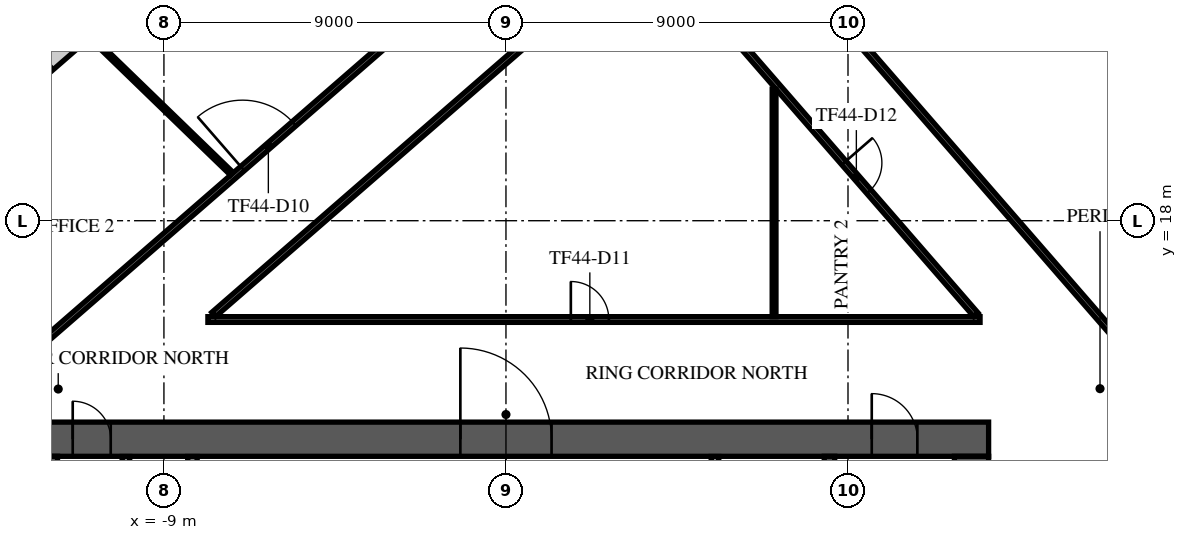
"""IFC4 building model, lengths in metres.
Left out: names, types, materials, properties, quantities, classifications, styles, units other than length and angle.
Written with IfcOpenShell. Run it as: python <this file> out.ifc"""

import sys

from ifc_helpers import new_model, si_unit, direction, frame, frame_2d, origin, place, context, subcontext, project, spatial, rectangle, extrude, element, fill, save


model = new_model("IFC4")
c1 = context("Model", 3, precision=1e-05, world=origin(), true_north=direction((0.0, 1.0)))
c2 = subcontext(c1, "Body", "Model", "MODEL_VIEW")
j1 = project(units=[si_unit("LENGTHUNIT", "METRE"), si_unit("PLANEANGLEUNIT", "RADIAN")], contexts=[c1])
p1 = place(None, origin())
s1 = spatial("IfcSite", under=j1, at=p1, CompositionType="ELEMENT")
p2 = place(p1, origin())
s2 = spatial("IfcBuilding", under=s1, at=p2, CompositionType="ELEMENT")
p3 = place(p2, frame((0.0, 0.0, 193.3)))
s3 = spatial("IfcBuildingStorey", under=s2, at=p3, CompositionType="ELEMENT", Elevation=193.3)
p4 = place(p3, frame((-12.7, 12.25, 0.0), z_axis=(0.0, 0.0, 1.0), x_axis=(1.0, 0.0, 0.0)))
e1 = element("IfcWall", 1, at=p4, inside=s3, PredefinedType="SHEAR", context=c2, shape_type="SweptSolid", body=[
    extrude(rectangle(XDim=25.4, YDim=0.9, at=frame_2d((12.7, 0.0))), origin(), (0.0, 0.0, 1.0), 3.62),
])
p5 = place(p4, frame((11.5, 0.0, 0.0)))
e2 = element("IfcOpeningElement", 2, at=p5, cuts=e1, PredefinedType="OPENING", context=c2, shape_type="SweptSolid", body=[
    extrude(rectangle(XDim=2.4, YDim=2.4, at=frame_2d((1.2, 1.2))), frame((0.0, 0.46, 0.0), z_axis=(0.0, -1.0, 0.0), x_axis=(1.0, 0.0, 0.0)), (0.0, 0.0, 1.0), 0.92),
])
p6 = place(p4, frame((22.325, 0.0, 0.0)))
e3 = element("IfcOpeningElement", 3, at=p6, cuts=e1, PredefinedType="OPENING", context=c2, shape_type="SweptSolid", body=[
    extrude(rectangle(XDim=1.2, YDim=2.1, at=frame_2d((0.6, 1.05))), frame((0.0, 0.46, 0.0), z_axis=(0.0, -1.0, 0.0), x_axis=(1.0, 0.0, 0.0)), (0.0, 0.0, 1.0), 0.92),
])
p7 = place(p4, frame((1.3, 0.0, 0.0)))
e4 = element("IfcOpeningElement", 4, at=p7, cuts=e1, PredefinedType="OPENING", context=c2, shape_type="SweptSolid", body=[
    extrude(rectangle(XDim=1.0, YDim=2.1, at=frame_2d((0.5, 1.05))), frame((0.0, 0.46, 0.0), z_axis=(0.0, -1.0, 0.0), x_axis=(1.0, 0.0, 0.0)), (0.0, 0.0, 1.0), 0.92),
])
p8 = place(p3, frame((12.25, -11.8, 0.0), z_axis=(0.0, 0.0, 1.0), x_axis=(0.0, 1.0, 0.0)))
e5 = element("IfcWall", 5, at=p8, inside=s3, PredefinedType="SHEAR", context=c2, shape_type="SweptSolid", body=[
    extrude(rectangle(XDim=23.6, YDim=0.9, at=frame_2d((11.8, 0.0))), origin(), (0.0, 0.0, 1.0), 3.62),
])
p9 = place(p8, frame((10.6, 0.0, 0.0)))
e6 = element("IfcOpeningElement", 6, at=p9, cuts=e5, PredefinedType="OPENING", context=c2, shape_type="SweptSolid", body=[
    extrude(rectangle(XDim=2.4, YDim=2.4, at=frame_2d((1.2, 1.2))), frame((0.0, 0.46, 0.0), z_axis=(0.0, -1.0, 0.0), x_axis=(1.0, 0.0, 0.0)), (0.0, 0.0, 1.0), 0.92),
])
p10 = place(p3, frame((-12.25, -11.8, 0.0), z_axis=(0.0, 0.0, 1.0), x_axis=(0.0, 1.0, 0.0)))
e7 = element("IfcWall", 7, at=p10, inside=s3, PredefinedType="SHEAR", context=c2, shape_type="SweptSolid", body=[
    extrude(rectangle(XDim=23.6, YDim=0.9, at=frame_2d((11.8, 0.0))), origin(), (0.0, 0.0, 1.0), 3.62),
])
p11 = place(p10, frame((10.6, 0.0, 0.0)))
e8 = element("IfcOpeningElement", 8, at=p11, cuts=e7, PredefinedType="OPENING", context=c2, shape_type="SweptSolid", body=[
    extrude(rectangle(XDim=2.4, YDim=2.4, at=frame_2d((1.2, 1.2))), frame((0.0, 0.46, 0.0), z_axis=(0.0, -1.0, 0.0), x_axis=(1.0, 0.0, 0.0)), (0.0, 0.0, 1.0), 0.92),
])
p12 = place(p3, frame((8.512, 4.55, 0.0), z_axis=(0.0, 0.0, 1.0), x_axis=(0.0, 1.0, 0.0)))
e9 = element("IfcWall", 9, at=p12, inside=s3, PredefinedType="SOLIDWALL", context=c2, shape_type="SweptSolid", body=[
    extrude(rectangle(XDim=7.25, YDim=0.275, at=frame_2d((3.625, 0.0))), origin(), (0.0, 0.0, 1.0), 3.62),
])
p13 = place(p12, frame((6.0, 0.0, 0.0)))
e10 = element("IfcOpeningElement", 10, at=p13, cuts=e9, PredefinedType="OPENING", context=c2, shape_type="SweptSolid", body=[
    extrude(rectangle(XDim=1.0, YDim=2.1, at=frame_2d((0.5, 1.05))), frame((0.0, 0.147, 0.0), z_axis=(0.0, -1.0, 0.0), x_axis=(1.0, 0.0, 0.0)), (0.0, 0.0, 1.0), 0.295),
])
p14 = place(p3, frame((-10.0, 4.78, 0.0), z_axis=(0.0, 0.0, 1.0), x_axis=(0.0, 1.0, 0.0)))
e11 = element("IfcWall", 11, at=p14, inside=s3, PredefinedType="PARTITIONING", context=c2, shape_type="SweptSolid", body=[
    extrude(rectangle(XDim=7.015, YDim=0.2, at=frame_2d((3.507, 0.0))), origin(), (0.0, 0.0, 1.0), 3.62),
])
p15 = place(p14, frame((2.92, 0.0, 0.0)))
e12 = element("IfcOpeningElement", 12, at=p15, cuts=e11, PredefinedType="OPENING", context=c2, shape_type="SweptSolid", body=[
    extrude(rectangle(XDim=1.0, YDim=2.1, at=frame_2d((0.5, 1.05))), frame((0.0, 0.11, 0.0), z_axis=(0.0, -1.0, 0.0), x_axis=(1.0, 0.0, 0.0)), (0.0, 0.0, 1.0), 0.22),
])
p16 = place(p3, frame((-8.25, 8.805, 0.0), z_axis=(0.0, 0.0, 1.0), x_axis=(0.0, 1.0, 0.0)))
e13 = element("IfcWall", 13, at=p16, inside=s3, PredefinedType="PARTITIONING", context=c2, shape_type="SweptSolid", body=[
    extrude(rectangle(XDim=2.99, YDim=0.25, at=frame_2d((1.495, 0.0))), origin(), (0.0, 0.0, 1.0), 3.62),
])
p17 = place(p16, frame((0.895, 0.0, 0.0)))
e14 = element("IfcOpeningElement", 14, at=p17, cuts=e13, PredefinedType="OPENING", context=c2, shape_type="SweptSolid", body=[
    extrude(rectangle(XDim=1.0, YDim=2.1, at=frame_2d((0.5, 1.05))), frame((0.0, 0.135, 0.0), z_axis=(0.0, -1.0, 0.0), x_axis=(1.0, 0.0, 0.0)), (0.0, 0.0, 1.0), 0.27),
])
p18 = place(p3, frame((5.5, 8.805, 0.0), z_axis=(0.0, 0.0, 1.0), x_axis=(0.0, 1.0, 0.0)))
e15 = element("IfcWall", 15, at=p18, inside=s3, PredefinedType="PARTITIONING", context=c2, shape_type="SweptSolid", body=[
    extrude(rectangle(XDim=2.99, YDim=0.2, at=frame_2d((1.495, 0.0))), origin(), (0.0, 0.0, 1.0), 3.62),
])
p19 = place(p18, frame((0.532, 0.0, 0.0)))
e16 = element("IfcOpeningElement", 16, at=p19, cuts=e15, PredefinedType="OPENING", context=c2, shape_type="SweptSolid", body=[
    extrude(rectangle(XDim=1.8, YDim=2.1, at=frame_2d((0.9, 1.05))), frame((0.0, 0.11, 0.0), z_axis=(0.0, -1.0, 0.0), x_axis=(1.0, 0.0, 0.0)), (0.0, 0.0, 1.0), 0.22),
])
p20 = place(p3, frame((2.286, 34.715, 0.0), z_axis=(0.0, 0.0, 1.0), x_axis=(-0.754708272811, -0.656060532993, 0.0)))
e17 = element("IfcWall", 17, at=p20, inside=s3, PredefinedType="STANDARD", context=c2, shape_type="SweptSolid", body=[
    extrude(rectangle(XDim=49.0, YDim=0.6, at=frame_2d((24.5, 0.0))), origin(), (0.0, 0.0, 1.0), 3.62),
])
p21 = place(p20, frame((1.227, 0.0, 0.9)))
e18 = element("IfcOpeningElement", 18, at=p21, cuts=e17, PredefinedType="OPENING", context=c2, shape_type="SweptSolid", body=[
    extrude(rectangle(XDim=2.0, YDim=2.1, at=frame_2d((1.0, 1.05))), frame((0.0, 0.31, 0.0), z_axis=(0.0, -1.0, 0.0), x_axis=(1.0, 0.0, 0.0)), (0.0, 0.0, 1.0), 0.62),
])
p22 = place(p20, frame((5.682, 0.0, 0.9)))
e19 = element("IfcOpeningElement", 19, at=p22, cuts=e17, PredefinedType="OPENING", context=c2, shape_type="SweptSolid", body=[
    extrude(rectangle(XDim=2.0, YDim=2.1, at=frame_2d((1.0, 1.05))), frame((0.0, 0.31, 0.0), z_axis=(0.0, -1.0, 0.0), x_axis=(1.0, 0.0, 0.0)), (0.0, 0.0, 1.0), 0.62),
])
p23 = place(p20, frame((10.136, 0.0, 0.9)))
e20 = element("IfcOpeningElement", 20, at=p23, cuts=e17, PredefinedType="OPENING", context=c2, shape_type="SweptSolid", body=[
    extrude(rectangle(XDim=2.0, YDim=2.1, at=frame_2d((1.0, 1.05))), frame((0.0, 0.31, 0.0), z_axis=(0.0, -1.0, 0.0), x_axis=(1.0, 0.0, 0.0)), (0.0, 0.0, 1.0), 0.62),
])
p24 = place(p20, frame((14.591, 0.0, 0.9)))
e21 = element("IfcOpeningElement", 21, at=p24, cuts=e17, PredefinedType="OPENING", context=c2, shape_type="SweptSolid", body=[
    extrude(rectangle(XDim=2.0, YDim=2.1, at=frame_2d((1.0, 1.05))), frame((0.0, 0.31, 0.0), z_axis=(0.0, -1.0, 0.0), x_axis=(1.0, 0.0, 0.0)), (0.0, 0.0, 1.0), 0.62),
])
p25 = place(p20, frame((19.045, 0.0, 0.9)))
e22 = element("IfcOpeningElement", 22, at=p25, cuts=e17, PredefinedType="OPENING", context=c2, shape_type="SweptSolid", body=[
    extrude(rectangle(XDim=2.0, YDim=2.1, at=frame_2d((1.0, 1.05))), frame((0.0, 0.31, 0.0), z_axis=(0.0, -1.0, 0.0), x_axis=(1.0, 0.0, 0.0)), (0.0, 0.0, 1.0), 0.62),
])
p26 = place(p20, frame((23.5, 0.0, 0.9)))
e23 = element("IfcOpeningElement", 23, at=p26, cuts=e17, PredefinedType="OPENING", context=c2, shape_type="SweptSolid", body=[
    extrude(rectangle(XDim=2.0, YDim=2.1, at=frame_2d((1.0, 1.05))), frame((0.0, 0.31, 0.0), z_axis=(0.0, -1.0, 0.0), x_axis=(1.0, 0.0, 0.0)), (0.0, 0.0, 1.0), 0.62),
])
p27 = place(p20, frame((27.955, 0.0, 0.9)))
e24 = element("IfcOpeningElement", 24, at=p27, cuts=e17, PredefinedType="OPENING", context=c2, shape_type="SweptSolid", body=[
    extrude(rectangle(XDim=2.0, YDim=2.1, at=frame_2d((1.0, 1.05))), frame((0.0, 0.31, 0.0), z_axis=(0.0, -1.0, 0.0), x_axis=(1.0, 0.0, 0.0)), (0.0, 0.0, 1.0), 0.62),
])
p28 = place(p20, frame((32.409, 0.0, 0.9)))
e25 = element("IfcOpeningElement", 25, at=p28, cuts=e17, PredefinedType="OPENING", context=c2, shape_type="SweptSolid", body=[
    extrude(rectangle(XDim=2.0, YDim=2.1, at=frame_2d((1.0, 1.05))), frame((0.0, 0.31, 0.0), z_axis=(0.0, -1.0, 0.0), x_axis=(1.0, 0.0, 0.0)), (0.0, 0.0, 1.0), 0.62),
])
p29 = place(p20, frame((36.864, 0.0, 0.9)))
e26 = element("IfcOpeningElement", 26, at=p29, cuts=e17, PredefinedType="OPENING", context=c2, shape_type="SweptSolid", body=[
    extrude(rectangle(XDim=2.0, YDim=2.1, at=frame_2d((1.0, 1.05))), frame((0.0, 0.31, 0.0), z_axis=(0.0, -1.0, 0.0), x_axis=(1.0, 0.0, 0.0)), (0.0, 0.0, 1.0), 0.62),
])
p30 = place(p20, frame((41.318, 0.0, 0.9)))
e27 = element("IfcOpeningElement", 27, at=p30, cuts=e17, PredefinedType="OPENING", context=c2, shape_type="SweptSolid", body=[
    extrude(rectangle(XDim=2.0, YDim=2.1, at=frame_2d((1.0, 1.05))), frame((0.0, 0.31, 0.0), z_axis=(0.0, -1.0, 0.0), x_axis=(1.0, 0.0, 0.0)), (0.0, 0.0, 1.0), 0.62),
])
p31 = place(p20, frame((45.773, 0.0, 0.9)))
e28 = element("IfcOpeningElement", 28, at=p31, cuts=e17, PredefinedType="OPENING", context=c2, shape_type="SweptSolid", body=[
    extrude(rectangle(XDim=2.0, YDim=2.1, at=frame_2d((1.0, 1.05))), frame((0.0, 0.31, 0.0), z_axis=(0.0, -1.0, 0.0), x_axis=(1.0, 0.0, 0.0)), (0.0, 0.0, 1.0), 0.62),
])
p32 = place(p3, frame((35.208, 4.768, 0.0), z_axis=(0.0, 0.0, 1.0), x_axis=(-0.656058749455, 0.754709823219, 0.0)))
e29 = element("IfcWall", 29, at=p32, inside=s3, PredefinedType="STANDARD", context=c2, shape_type="SweptSolid", body=[
    extrude(rectangle(XDim=39.0, YDim=0.6, at=frame_2d((19.5, 0.0))), origin(), (0.0, 0.0, 1.0), 3.62),
])
p33 = place(p32, frame((1.217, 0.0, 0.9)))
e30 = element("IfcOpeningElement", 30, at=p33, cuts=e29, PredefinedType="OPENING", context=c2, shape_type="SweptSolid", body=[
    extrude(rectangle(XDim=1.9, YDim=2.1, at=frame_2d((0.95, 1.05))), frame((0.0, 0.31, 0.0), z_axis=(0.0, -1.0, 0.0), x_axis=(1.0, 0.0, 0.0)), (0.0, 0.0, 1.0), 0.62),
])
p34 = place(p32, frame((5.55, 0.0, 0.9)))
e31 = element("IfcOpeningElement", 31, at=p34, cuts=e29, PredefinedType="OPENING", context=c2, shape_type="SweptSolid", body=[
    extrude(rectangle(XDim=1.9, YDim=2.1, at=frame_2d((0.95, 1.05))), frame((0.0, 0.31, 0.0), z_axis=(0.0, -1.0, 0.0), x_axis=(1.0, 0.0, 0.0)), (0.0, 0.0, 1.0), 0.62),
])
p35 = place(p32, frame((9.883, 0.0, 0.9)))
e32 = element("IfcOpeningElement", 32, at=p35, cuts=e29, PredefinedType="OPENING", context=c2, shape_type="SweptSolid", body=[
    extrude(rectangle(XDim=1.9, YDim=2.1, at=frame_2d((0.95, 1.05))), frame((0.0, 0.31, 0.0), z_axis=(0.0, -1.0, 0.0), x_axis=(1.0, 0.0, 0.0)), (0.0, 0.0, 1.0), 0.62),
])
p36 = place(p32, frame((14.217, 0.0, 0.9)))
e33 = element("IfcOpeningElement", 33, at=p36, cuts=e29, PredefinedType="OPENING", context=c2, shape_type="SweptSolid", body=[
    extrude(rectangle(XDim=1.9, YDim=2.1, at=frame_2d((0.95, 1.05))), frame((0.0, 0.31, 0.0), z_axis=(0.0, -1.0, 0.0), x_axis=(1.0, 0.0, 0.0)), (0.0, 0.0, 1.0), 0.62),
])
p37 = place(p32, frame((18.55, 0.0, 0.9)))
e34 = element("IfcOpeningElement", 34, at=p37, cuts=e29, PredefinedType="OPENING", context=c2, shape_type="SweptSolid", body=[
    extrude(rectangle(XDim=1.9, YDim=2.1, at=frame_2d((0.95, 1.05))), frame((0.0, 0.31, 0.0), z_axis=(0.0, -1.0, 0.0), x_axis=(1.0, 0.0, 0.0)), (0.0, 0.0, 1.0), 0.62),
])
p38 = place(p32, frame((22.883, 0.0, 0.9)))
e35 = element("IfcOpeningElement", 35, at=p38, cuts=e29, PredefinedType="OPENING", context=c2, shape_type="SweptSolid", body=[
    extrude(rectangle(XDim=1.9, YDim=2.1, at=frame_2d((0.95, 1.05))), frame((0.0, 0.31, 0.0), z_axis=(0.0, -1.0, 0.0), x_axis=(1.0, 0.0, 0.0)), (0.0, 0.0, 1.0), 0.62),
])
p39 = place(p32, frame((27.217, 0.0, 0.9)))
e36 = element("IfcOpeningElement", 36, at=p39, cuts=e29, PredefinedType="OPENING", context=c2, shape_type="SweptSolid", body=[
    extrude(rectangle(XDim=1.9, YDim=2.1, at=frame_2d((0.95, 1.05))), frame((0.0, 0.31, 0.0), z_axis=(0.0, -1.0, 0.0), x_axis=(1.0, 0.0, 0.0)), (0.0, 0.0, 1.0), 0.62),
])
p40 = place(p32, frame((31.55, 0.0, 0.9)))
e37 = element("IfcOpeningElement", 37, at=p40, cuts=e29, PredefinedType="OPENING", context=c2, shape_type="SweptSolid", body=[
    extrude(rectangle(XDim=1.9, YDim=2.1, at=frame_2d((0.95, 1.05))), frame((0.0, 0.31, 0.0), z_axis=(0.0, -1.0, 0.0), x_axis=(1.0, 0.0, 0.0)), (0.0, 0.0, 1.0), 0.62),
])
p41 = place(p32, frame((35.883, 0.0, 0.9)))
e38 = element("IfcOpeningElement", 38, at=p41, cuts=e29, PredefinedType="OPENING", context=c2, shape_type="SweptSolid", body=[
    extrude(rectangle(XDim=1.9, YDim=2.1, at=frame_2d((0.95, 1.05))), frame((0.0, 0.31, 0.0), z_axis=(0.0, -1.0, 0.0), x_axis=(1.0, 0.0, 0.0)), (0.0, 0.0, 1.0), 0.62),
])
p42 = place(p3, frame((-26.208, 2.616, 0.0), z_axis=(0.0, 0.0, 1.0), x_axis=(0.754710701231, 0.656057739416, 0.0)))
e39 = element("IfcWall", 39, at=p42, inside=s3, PredefinedType="PARTITIONING", context=c2, shape_type="SweptSolid", body=[
    extrude(rectangle(XDim=36.126, YDim=0.15, at=frame_2d((18.063, 0.0))), origin(), (0.0, 0.0, 1.0), 3.17),
])
p43 = place(p42, frame((2.551, 0.0, 0.0)))
e40 = element("IfcOpeningElement", 40, at=p43, cuts=e39, PredefinedType="OPENING", context=c2, shape_type="SweptSolid", body=[
    extrude(rectangle(XDim=1.0, YDim=2.1, at=frame_2d((0.5, 1.05))), frame((0.0, 0.085, 0.0), z_axis=(0.0, -1.0, 0.0), x_axis=(1.0, 0.0, 0.0)), (0.0, 0.0, 1.0), 0.17),
])
p44 = place(p42, frame((15.362, 0.0, 0.0)))
e41 = element("IfcOpeningElement", 41, at=p44, cuts=e39, PredefinedType="OPENING", context=c2, shape_type="SweptSolid", body=[
    extrude(rectangle(XDim=1.0, YDim=2.1, at=frame_2d((0.5, 1.05))), frame((0.0, 0.085, 0.0), z_axis=(0.0, -1.0, 0.0), x_axis=(1.0, 0.0, 0.0)), (0.0, 0.0, 1.0), 0.17),
])
p45 = place(p42, frame((25.542, 0.0, 0.0)))
e42 = element("IfcOpeningElement", 42, at=p45, cuts=e39, PredefinedType="OPENING", context=c2, shape_type="SweptSolid", body=[
    extrude(rectangle(XDim=1.8, YDim=2.1, at=frame_2d((0.9, 1.05))), frame((0.0, 0.085, 0.0), z_axis=(0.0, -1.0, 0.0), x_axis=(1.0, 0.0, 0.0)), (0.0, 0.0, 1.0), 0.17),
])
p46 = place(p3, frame((-7.843, 15.4, 0.0), z_axis=(0.0, 0.0, 1.0), x_axis=(1.0, 0.0, 0.0)))
e43 = element("IfcWall", 43, at=p46, inside=s3, PredefinedType="PARTITIONING", context=c2, shape_type="SweptSolid", body=[
    extrude(rectangle(XDim=20.318, YDim=0.15, at=frame_2d((10.159, 0.0))), origin(), (0.0, 0.0, 1.0), 3.17),
])
p47 = place(p46, frame((9.55, 0.0, 0.0)))
e44 = element("IfcOpeningElement", 44, at=p47, cuts=e43, PredefinedType="OPENING", context=c2, shape_type="SweptSolid", body=[
    extrude(rectangle(XDim=1.0, YDim=2.1, at=frame_2d((0.5, 1.05))), frame((0.0, 0.085, 0.0), z_axis=(0.0, -1.0, 0.0), x_axis=(1.0, 0.0, 0.0)), (0.0, 0.0, 1.0), 0.17),
])
p48 = place(p3, frame((-7.692, 15.531, 0.0), z_axis=(0.0, 0.0, 1.0), x_axis=(0.754705202017, 0.656064065506, 0.0)))
e45 = element("IfcWall", 45, at=p48, inside=s3, PredefinedType="PARTITIONING", context=c2, shape_type="SweptSolid", body=[
    extrude(rectangle(XDim=13.603, YDim=0.15, at=frame_2d((6.801, 0.0))), origin(), (0.0, 0.0, 1.0), 3.17),
])
p49 = place(p3, frame((6.292, 22.512, 0.0), z_axis=(0.0, 0.0, 1.0), x_axis=(0.656052066859, -0.754715632255, 0.0)))
e46 = element("IfcWall", 46, at=p49, inside=s3, PredefinedType="PARTITIONING", context=c2, shape_type="SweptSolid", body=[
    extrude(rectangle(XDim=9.26, YDim=0.15, at=frame_2d((4.63, 0.0))), origin(), (0.0, 0.0, 1.0), 3.17),
])
p50 = place(p49, frame((3.963, 0.0, 0.0)))
e47 = element("IfcOpeningElement", 47, at=p50, cuts=e46, PredefinedType="OPENING", context=c2, shape_type="SweptSolid", body=[
    extrude(rectangle(XDim=1.0, YDim=2.1, at=frame_2d((0.5, 1.05))), frame((0.0, 0.085, 0.0), z_axis=(0.0, -1.0, 0.0), x_axis=(1.0, 0.0, 0.0)), (0.0, 0.0, 1.0), 0.17),
])
p51 = place(p3, frame((8.103, 24.087, 0.0), z_axis=(0.0, 0.0, 1.0), x_axis=(0.656048444225, -0.754718781289, 0.0)))
e48 = element("IfcWall", 48, at=p51, inside=s3, PredefinedType="PARTITIONING", context=c2, shape_type="SweptSolid", body=[
    extrude(rectangle(XDim=25.8, YDim=0.15, at=frame_2d((12.9, 0.0))), origin(), (0.0, 0.0, 1.0), 3.17),
])
p52 = place(p3, frame((-10.926, 22.83, 0.0), z_axis=(0.0, 0.0, 1.0), x_axis=(0.718303647436, -0.695729739252, 0.0)))
e49 = element("IfcWall", 49, at=p52, inside=s3, PredefinedType="PARTITIONING", context=c2, shape_type="SweptSolid", body=[
    extrude(rectangle(XDim=5.17, YDim=0.1, at=frame_2d((2.585, 0.0))), origin(), (0.0, 0.0, 1.0), 3.17),
])
p53 = place(p3, frame((7.055, 15.475, 0.0), z_axis=(0.0, 0.0, 1.0), x_axis=(0.0, 1.0, 0.0)))
e50 = element("IfcWall", 50, at=p53, inside=s3, PredefinedType="PARTITIONING", context=c2, shape_type="SweptSolid", body=[
    extrude(rectangle(XDim=5.988, YDim=0.1, at=frame_2d((2.994, 0.0))), origin(), (0.0, 0.0, 1.0), 3.62),
])
p54 = place(p5, origin())
e51 = element("IfcDoor", 51, at=p54, inside=s3, OperationType="SINGLE_SWING_LEFT", PredefinedType="DOOR", context=c2, shape_type="SweptSolid", body=[
    extrude(rectangle(XDim=2.4, YDim=2.4, at=frame_2d((1.2, 1.2))), frame((0.0, 0.025, 0.0), z_axis=(0.0, -1.0, 0.0), x_axis=(1.0, 0.0, 0.0)), (0.0, 0.0, 1.0), 0.05),
])
fill(e2, e51)
p55 = place(p6, origin())
e52 = element("IfcDoor", 52, at=p55, inside=s3, OperationType="SINGLE_SWING_LEFT", PredefinedType="DOOR", context=c2, shape_type="SweptSolid", body=[
    extrude(rectangle(XDim=1.2, YDim=2.1, at=frame_2d((0.6, 1.05))), frame((0.0, 0.025, 0.0), z_axis=(0.0, -1.0, 0.0), x_axis=(1.0, 0.0, 0.0)), (0.0, 0.0, 1.0), 0.05),
])
fill(e3, e52)
p56 = place(p7, origin())
e53 = element("IfcDoor", 53, at=p56, inside=s3, OperationType="SINGLE_SWING_LEFT", PredefinedType="DOOR", context=c2, shape_type="SweptSolid", body=[
    extrude(rectangle(XDim=1.0, YDim=2.1, at=frame_2d((0.5, 1.05))), frame((0.0, 0.025, 0.0), z_axis=(0.0, -1.0, 0.0), x_axis=(1.0, 0.0, 0.0)), (0.0, 0.0, 1.0), 0.05),
])
fill(e4, e53)
p57 = place(p45, origin())
e54 = element("IfcDoor", 54, at=p57, inside=s3, OperationType="DOUBLE_DOOR_SINGLE_SWING", PredefinedType="DOOR", context=c2, shape_type="SweptSolid", body=[
    extrude(rectangle(XDim=1.8, YDim=2.1, at=frame_2d((0.9, 1.05))), frame((0.0, 0.025, 0.0), z_axis=(0.0, -1.0, 0.0), x_axis=(1.0, 0.0, 0.0)), (0.0, 0.0, 1.0), 0.05),
])
fill(e42, e54)
p58 = place(p47, origin())
e55 = element("IfcDoor", 55, at=p58, inside=s3, OperationType="SINGLE_SWING_LEFT", PredefinedType="DOOR", context=c2, shape_type="SweptSolid", body=[
    extrude(rectangle(XDim=1.0, YDim=2.1, at=frame_2d((0.5, 1.05))), frame((0.0, 0.025, 0.0), z_axis=(0.0, -1.0, 0.0), x_axis=(1.0, 0.0, 0.0)), (0.0, 0.0, 1.0), 0.05),
])
fill(e44, e55)
p59 = place(p50, frame((1.0, 0.0, 0.0), z_axis=(0.0, 0.0, 1.0), x_axis=(-1.0, 0.0, 0.0)))
e56 = element("IfcDoor", 56, at=p59, inside=s3, OperationType="SINGLE_SWING_RIGHT", PredefinedType="DOOR", context=c2, shape_type="SweptSolid", body=[
    extrude(rectangle(XDim=1.0, YDim=2.1, at=frame_2d((0.5, 1.05))), frame((0.0, 0.025, 0.0), z_axis=(0.0, -1.0, 0.0), x_axis=(1.0, 0.0, 0.0)), (0.0, 0.0, 1.0), 0.05),
])
fill(e47, e56)
save(model, sys.argv[1])
